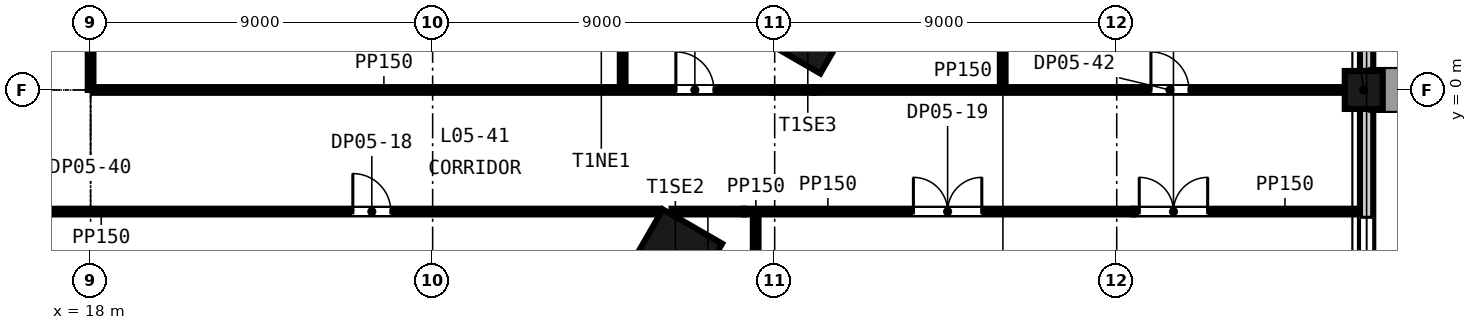
"""IFC4 building model, lengths in metres.
Left out: names, types, materials, properties, quantities, classifications, styles, units other than length and angle.
Written with IfcOpenShell. Run it as: python <this file> out.ifc"""

import sys

from ifc_helpers import new_model, si_unit, direction, frame, frame_2d, origin, origin_2d, place, context, subcontext, project, spatial, rectangle, extrude, element, fill, save


model = new_model("IFC4")
c1 = context("Model", 3, precision=1e-05, world=origin(), true_north=direction((0.0, 1.0)))
c2 = subcontext(c1, "Body", "Model", "MODEL_VIEW")
j1 = project(units=[si_unit("LENGTHUNIT", "METRE"), si_unit("PLANEANGLEUNIT", "RADIAN")], contexts=[c1])
p1 = place(None, origin())
s1 = spatial("IfcSite", under=j1, at=p1, CompositionType="ELEMENT")
p2 = place(p1, origin())
s2 = spatial("IfcBuilding", under=s1, at=p2, CompositionType="ELEMENT")
p3 = place(p2, frame((0.0, 0.0, 31.5)))
s3 = spatial("IfcBuildingStorey", under=s2, at=p3, CompositionType="ELEMENT", Elevation=31.5)
for number, where, z_axis, x_axis in (
    (1, (33.387, -4.373, -0.3), (0.0, 0.0, 1.0), (0.5, 0.866, 0.0)),
    (2, (36.872, 1.663, -0.3), (0.0, 0.0, 1.0), (0.5, 0.866, 0.0)),
):
    element("IfcColumn", number, at=place(p3, frame(where, z_axis=z_axis, x_axis=x_axis)), inside=s3, PredefinedType="COLUMN", context=c2, shape_type="SweptSolid", body=[
        extrude(rectangle(XDim=1.8, YDim=1.8, at=origin_2d()), origin(), (0.0, 0.0, 1.0), 4.65),
    ])
p4 = place(p3, frame((51.5, 0.0, -0.3), z_axis=(0.0, 0.0, 1.0), x_axis=(0.0, 1.0, 0.0)))
e3 = element("IfcColumn", 3, at=p4, inside=s3, PredefinedType="COLUMN", context=c2, shape_type="SweptSolid", body=[
    extrude(rectangle(XDim=1.0, YDim=1.0, at=origin_2d()), origin(), (0.0, 0.0, 1.0), 4.65),
])
p5 = place(p3, frame((51.575, -8.2, -0.3), z_axis=(0.0, 0.0, 1.0), x_axis=(0.0, 1.0, 0.0)))
e4 = element("IfcWall", 4, at=p5, inside=s3, PredefinedType="SOLIDWALL", context=c2, shape_type="SweptSolid", body=[
    extrude(rectangle(XDim=7.7, YDim=0.35, at=frame_2d((3.85, 0.0))), origin(), (0.0, 0.0, 1.0), 3.75),
])
p6 = place(p5, frame((2.85, 0.0, 1.2)))
e5 = element("IfcOpeningElement", 5, at=p6, cuts=e4, PredefinedType="OPENING", context=c2, shape_type="SweptSolid", body=[
    extrude(rectangle(XDim=2.0, YDim=2.5, at=frame_2d((1.0, 1.25))), frame((0.0, 0.185, 0.0), z_axis=(0.0, -1.0, 0.0), x_axis=(1.0, 0.0, 0.0)), (0.0, 0.0, 1.0), 0.37),
])
p7 = place(p3, frame((51.575, 0.5, -0.3), z_axis=(0.0, 0.0, 1.0), x_axis=(0.0, 1.0, 0.0)))
e6 = element("IfcWall", 6, at=p7, inside=s3, PredefinedType="SOLIDWALL", context=c2, shape_type="SweptSolid", body=[
    extrude(rectangle(XDim=7.75, YDim=0.35, at=frame_2d((3.875, 0.0))), origin(), (0.0, 0.0, 1.0), 3.75),
])
p8 = place(p7, frame((2.875, 0.0, 1.2)))
e7 = element("IfcOpeningElement", 7, at=p8, cuts=e6, PredefinedType="OPENING", context=c2, shape_type="SweptSolid", body=[
    extrude(rectangle(XDim=2.0, YDim=2.5, at=frame_2d((1.0, 1.25))), frame((0.0, 0.185, 0.0), z_axis=(0.0, -1.0, 0.0), x_axis=(1.0, 0.0, 0.0)), (0.0, 0.0, 1.0), 0.37),
])
p9 = place(p3, frame((-17.925, -3.2, 0.0), z_axis=(0.0, 0.0, 1.0), x_axis=(1.0, 0.0, 0.0)))
e8 = element("IfcWall", 8, at=p9, inside=s3, PredefinedType="PARTITIONING", context=c2, shape_type="SweptSolid", body=[
    extrude(rectangle(XDim=50.906, YDim=0.15, at=frame_2d((25.453, 0.0))), origin(), (0.0, 0.0, 1.0), 4.35),
])
p10 = place(p9, frame((3.9, 0.0, 0.0)))
e9 = element("IfcOpeningElement", 9, at=p10, cuts=e8, PredefinedType="OPENING", context=c2, shape_type="SweptSolid", body=[
    extrude(rectangle(XDim=1.0, YDim=2.1, at=frame_2d((0.5, 1.05))), frame((0.0, 0.085, 0.0), z_axis=(0.0, -1.0, 0.0), x_axis=(1.0, 0.0, 0.0)), (0.0, 0.0, 1.0), 0.17),
])
p11 = place(p9, frame((28.575, 0.0, 0.0)))
e10 = element("IfcOpeningElement", 10, at=p11, cuts=e8, PredefinedType="OPENING", context=c2, shape_type="SweptSolid", body=[
    extrude(rectangle(XDim=1.0, YDim=2.1, at=frame_2d((0.5, 1.05))), frame((0.0, 0.085, 0.0), z_axis=(0.0, -1.0, 0.0), x_axis=(1.0, 0.0, 0.0)), (0.0, 0.0, 1.0), 0.17),
])
p12 = place(p9, frame((42.825, 0.0, 0.0)))
e11 = element("IfcOpeningElement", 11, at=p12, cuts=e8, PredefinedType="OPENING", context=c2, shape_type="SweptSolid", body=[
    extrude(rectangle(XDim=1.0, YDim=2.1, at=frame_2d((0.5, 1.05))), frame((0.0, 0.085, 0.0), z_axis=(0.0, -1.0, 0.0), x_axis=(1.0, 0.0, 0.0)), (0.0, 0.0, 1.0), 0.17),
])
p13 = place(p9, frame((11.575, 0.0, 0.0)))
e12 = element("IfcOpeningElement", 12, at=p13, cuts=e8, PredefinedType="OPENING", context=c2, shape_type="SweptSolid", body=[
    extrude(rectangle(XDim=1.0, YDim=2.1, at=frame_2d((0.5, 1.05))), frame((0.0, 0.085, 0.0), z_axis=(0.0, -1.0, 0.0), x_axis=(1.0, 0.0, 0.0)), (0.0, 0.0, 1.0), 0.17),
])
p14 = place(p9, frame((18.025, 0.0, 0.0)))
e13 = element("IfcOpeningElement", 13, at=p14, cuts=e8, PredefinedType="OPENING", context=c2, shape_type="SweptSolid", body=[
    extrude(rectangle(XDim=1.0, YDim=2.1, at=frame_2d((0.5, 1.05))), frame((0.0, 0.085, 0.0), z_axis=(0.0, -1.0, 0.0), x_axis=(1.0, 0.0, 0.0)), (0.0, 0.0, 1.0), 0.17),
])
p15 = place(p9, frame((22.725, 0.0, 0.0)))
e14 = element("IfcOpeningElement", 14, at=p15, cuts=e8, PredefinedType="OPENING", context=c2, shape_type="SweptSolid", body=[
    extrude(rectangle(XDim=1.0, YDim=2.1, at=frame_2d((0.5, 1.05))), frame((0.0, 0.085, 0.0), z_axis=(0.0, -1.0, 0.0), x_axis=(1.0, 0.0, 0.0)), (0.0, 0.0, 1.0), 0.17),
])
p16 = place(p9, frame((25.475, 0.0, 0.0)))
e15 = element("IfcOpeningElement", 15, at=p16, cuts=e8, PredefinedType="OPENING", context=c2, shape_type="SweptSolid", body=[
    extrude(rectangle(XDim=1.0, YDim=2.1, at=frame_2d((0.5, 1.05))), frame((0.0, 0.085, 0.0), z_axis=(0.0, -1.0, 0.0), x_axis=(1.0, 0.0, 0.0)), (0.0, 0.0, 1.0), 0.17),
])
p17 = place(p3, frame((33.286, -3.2, 0.0), z_axis=(0.0, 0.0, 1.0), x_axis=(1.0, 0.0, 0.0)))
e16 = element("IfcWall", 16, at=p17, inside=s3, PredefinedType="PARTITIONING", context=c2, shape_type="SweptSolid", body=[
    extrude(rectangle(XDim=1.904, YDim=0.15, at=frame_2d((0.952, 0.0))), origin(), (0.0, 0.0, 1.0), 3.5),
])
p18 = place(p3, frame((35.189, -3.2, 0.0), z_axis=(0.0, 0.0, 1.0), x_axis=(1.0, 0.0, 0.0)))
e17 = element("IfcWall", 17, at=p18, inside=s3, PredefinedType="PARTITIONING", context=c2, shape_type="SweptSolid", body=[
    extrude(rectangle(XDim=10.253, YDim=0.15, at=frame_2d((5.127, 0.0))), origin(), (0.0, 0.0, 1.0), 4.35),
])
p19 = place(p18, frame((4.46, 0.0, 0.0)))
e18 = element("IfcOpeningElement", 18, at=p19, cuts=e17, PredefinedType="OPENING", context=c2, shape_type="SweptSolid", body=[
    extrude(rectangle(XDim=1.8, YDim=2.4, at=frame_2d((0.9, 1.2))), frame((0.0, 0.085, 0.0), z_axis=(0.0, -1.0, 0.0), x_axis=(1.0, 0.0, 0.0)), (0.0, 0.0, 1.0), 0.17),
])
p20 = place(p3, frame((45.443, -3.2, 0.0), z_axis=(0.0, 0.0, 1.0), x_axis=(1.0, 0.0, 0.0)))
e19 = element("IfcWall", 19, at=p20, inside=s3, PredefinedType="PARTITIONING", context=c2, shape_type="SweptSolid", body=[
    extrude(rectangle(XDim=5.957, YDim=0.15, at=frame_2d((2.979, 0.0))), origin(), (0.0, 0.0, 1.0), 3.515),
])
p21 = place(p20, frame((0.15, 0.0, 0.0)))
e20 = element("IfcOpeningElement", 20, at=p21, cuts=e19, PredefinedType="OPENING", context=c2, shape_type="SweptSolid", body=[
    extrude(rectangle(XDim=1.8, YDim=2.4, at=frame_2d((0.9, 1.2))), frame((0.0, 0.085, 0.0), z_axis=(0.0, -1.0, 0.0), x_axis=(1.0, 0.0, 0.0)), (0.0, 0.0, 1.0), 0.17),
])
p22 = place(p3, frame((18.075, 0.0, 0.0), z_axis=(0.0, 0.0, 1.0), x_axis=(1.0, 0.0, 0.0)))
e21 = element("IfcWall", 21, at=p22, inside=s3, PredefinedType="PARTITIONING", context=c2, shape_type="SweptSolid", body=[
    extrude(rectangle(XDim=17.865, YDim=0.15, at=frame_2d((8.933, 0.0))), origin(), (0.0, 0.0, 1.0), 4.35),
])
p23 = place(p22, frame((15.325, 0.0, 0.0)))
e22 = element("IfcOpeningElement", 22, at=p23, cuts=e21, PredefinedType="OPENING", context=c2, shape_type="SweptSolid", body=[
    extrude(rectangle(XDim=1.0, YDim=2.1, at=frame_2d((0.5, 1.05))), frame((0.0, 0.085, 0.0), z_axis=(0.0, -1.0, 0.0), x_axis=(1.0, 0.0, 0.0)), (0.0, 0.0, 1.0), 0.17),
])
p24 = place(p3, frame((35.94, 0.0, 0.0), z_axis=(0.0, 0.0, 1.0), x_axis=(1.0, 0.0, 0.0)))
e23 = element("IfcWall", 23, at=p24, inside=s3, PredefinedType="PARTITIONING", context=c2, shape_type="SweptSolid", body=[
    extrude(rectangle(XDim=1.097, YDim=0.15, at=frame_2d((0.548, 0.0))), origin(), (0.0, 0.0, 1.0), 3.5),
])
p25 = place(p3, frame((37.037, 0.0, 0.0), z_axis=(0.0, 0.0, 1.0), x_axis=(1.0, 0.0, 0.0)))
e24 = element("IfcWall", 24, at=p25, inside=s3, PredefinedType="PARTITIONING", context=c2, shape_type="SweptSolid", body=[
    extrude(rectangle(XDim=13.963, YDim=0.15, at=frame_2d((6.981, 0.0))), origin(), (0.0, 0.0, 1.0), 4.35),
])
p26 = place(p25, frame((8.863, 0.0, 0.0)))
e25 = element("IfcOpeningElement", 25, at=p26, cuts=e24, PredefinedType="OPENING", context=c2, shape_type="SweptSolid", body=[
    extrude(rectangle(XDim=1.0, YDim=2.1, at=frame_2d((0.5, 1.05))), frame((0.0, 0.085, 0.0), z_axis=(0.0, -1.0, 0.0), x_axis=(1.0, 0.0, 0.0)), (0.0, 0.0, 1.0), 0.17),
])
p27 = place(p3, frame((18.0, 0.0, 0.0), z_axis=(0.0, 0.0, 1.0), x_axis=(0.0, 1.0, 0.0)))
e26 = element("IfcWall", 26, at=p27, inside=s3, PredefinedType="PARTITIONING", context=c2, shape_type="SweptSolid", body=[
    extrude(rectangle(XDim=14.25, YDim=0.15, at=frame_2d((7.125, 0.0))), origin(), (0.0, 0.0, 1.0), 4.35),
])
p28 = place(p27, frame((6.65, 0.0, 0.0)))
e27 = element("IfcOpeningElement", 27, at=p28, cuts=e26, PredefinedType="OPENING", context=c2, shape_type="SweptSolid", body=[
    extrude(rectangle(XDim=1.0, YDim=2.1, at=frame_2d((0.5, 1.05))), frame((0.0, 0.085, 0.0), z_axis=(0.0, -1.0, 0.0), x_axis=(1.0, 0.0, 0.0)), (0.0, 0.0, 1.0), 0.17),
])
p29 = place(p3, frame((32.0, 0.075, 0.0), z_axis=(0.0, 0.0, 1.0), x_axis=(0.0, 1.0, 0.0)))
e28 = element("IfcWall", 28, at=p29, inside=s3, PredefinedType="PARTITIONING", context=c2, shape_type="SweptSolid", body=[
    extrude(rectangle(XDim=9.669, YDim=0.15, at=frame_2d((4.834, 0.0))), origin(), (0.0, 0.0, 1.0), 4.35),
])
p30 = place(p3, frame((35.5, -15.414, 0.0), z_axis=(0.0, 0.0, 1.0), x_axis=(0.0, 1.0, 0.0)))
e29 = element("IfcWall", 29, at=p30, inside=s3, PredefinedType="PARTITIONING", context=c2, shape_type="SweptSolid", body=[
    extrude(rectangle(XDim=12.139, YDim=0.15, at=frame_2d((6.07, 0.0))), origin(), (0.0, 0.0, 1.0), 4.35),
])
p31 = place(p3, frame((42.0, 0.075, 0.0), z_axis=(0.0, 0.0, 1.0), x_axis=(0.0, 1.0, 0.0)))
e30 = element("IfcWall", 30, at=p31, inside=s3, PredefinedType="PARTITIONING", context=c2, shape_type="SweptSolid", body=[
    extrude(rectangle(XDim=14.1, YDim=0.15, at=frame_2d((7.05, 0.0))), origin(), (0.0, 0.0, 1.0), 4.35),
])
p32 = place(p6, origin())
e31 = element("IfcWindow", 31, at=p32, inside=s3, PartitioningType="SINGLE_PANEL", PredefinedType="WINDOW", context=c2, shape_type="SweptSolid", body=[
    extrude(rectangle(XDim=2.0, YDim=2.5, at=frame_2d((1.0, 1.25))), frame((0.0, 0.03, 0.0), z_axis=(0.0, -1.0, 0.0), x_axis=(1.0, 0.0, 0.0)), (0.0, 0.0, 1.0), 0.06),
])
fill(e5, e31)
p33 = place(p12, origin())
e32 = element("IfcDoor", 32, at=p33, inside=s3, OperationType="SINGLE_SWING_LEFT", PredefinedType="DOOR", context=c2, shape_type="SweptSolid", body=[
    extrude(rectangle(XDim=1.0, YDim=2.1, at=frame_2d((0.5, 1.05))), frame((0.0, 0.025, 0.0), z_axis=(0.0, -1.0, 0.0), x_axis=(1.0, 0.0, 0.0)), (0.0, 0.0, 1.0), 0.05),
])
fill(e11, e32)
p34 = place(p19, origin())
e33 = element("IfcDoor", 33, at=p34, inside=s3, OperationType="SINGLE_SWING_LEFT", PredefinedType="DOOR", context=c2, shape_type="SweptSolid", body=[
    extrude(rectangle(XDim=1.8, YDim=2.4, at=frame_2d((0.9, 1.2))), frame((0.0, 0.025, 0.0), z_axis=(0.0, -1.0, 0.0), x_axis=(1.0, 0.0, 0.0)), (0.0, 0.0, 1.0), 0.05),
])
fill(e18, e33)
p35 = place(p21, origin())
e34 = element("IfcDoor", 34, at=p35, inside=s3, OperationType="SINGLE_SWING_LEFT", PredefinedType="DOOR", context=c2, shape_type="SweptSolid", body=[
    extrude(rectangle(XDim=1.8, YDim=2.4, at=frame_2d((0.9, 1.2))), frame((0.0, 0.025, 0.0), z_axis=(0.0, -1.0, 0.0), x_axis=(1.0, 0.0, 0.0)), (0.0, 0.0, 1.0), 0.05),
])
fill(e20, e34)
p36 = place(p23, origin())
e35 = element("IfcDoor", 35, at=p36, inside=s3, OperationType="SINGLE_SWING_LEFT", PredefinedType="DOOR", context=c2, shape_type="SweptSolid", body=[
    extrude(rectangle(XDim=1.0, YDim=2.1, at=frame_2d((0.5, 1.05))), frame((0.0, 0.025, 0.0), z_axis=(0.0, -1.0, 0.0), x_axis=(1.0, 0.0, 0.0)), (0.0, 0.0, 1.0), 0.05),
])
fill(e22, e35)
p37 = place(p26, origin())
e36 = element("IfcDoor", 36, at=p37, inside=s3, OperationType="SINGLE_SWING_LEFT", PredefinedType="DOOR", context=c2, shape_type="SweptSolid", body=[
    extrude(rectangle(XDim=1.0, YDim=2.1, at=frame_2d((0.5, 1.05))), frame((0.0, 0.025, 0.0), z_axis=(0.0, -1.0, 0.0), x_axis=(1.0, 0.0, 0.0)), (0.0, 0.0, 1.0), 0.05),
])
fill(e25, e36)
save(model, sys.argv[1])
